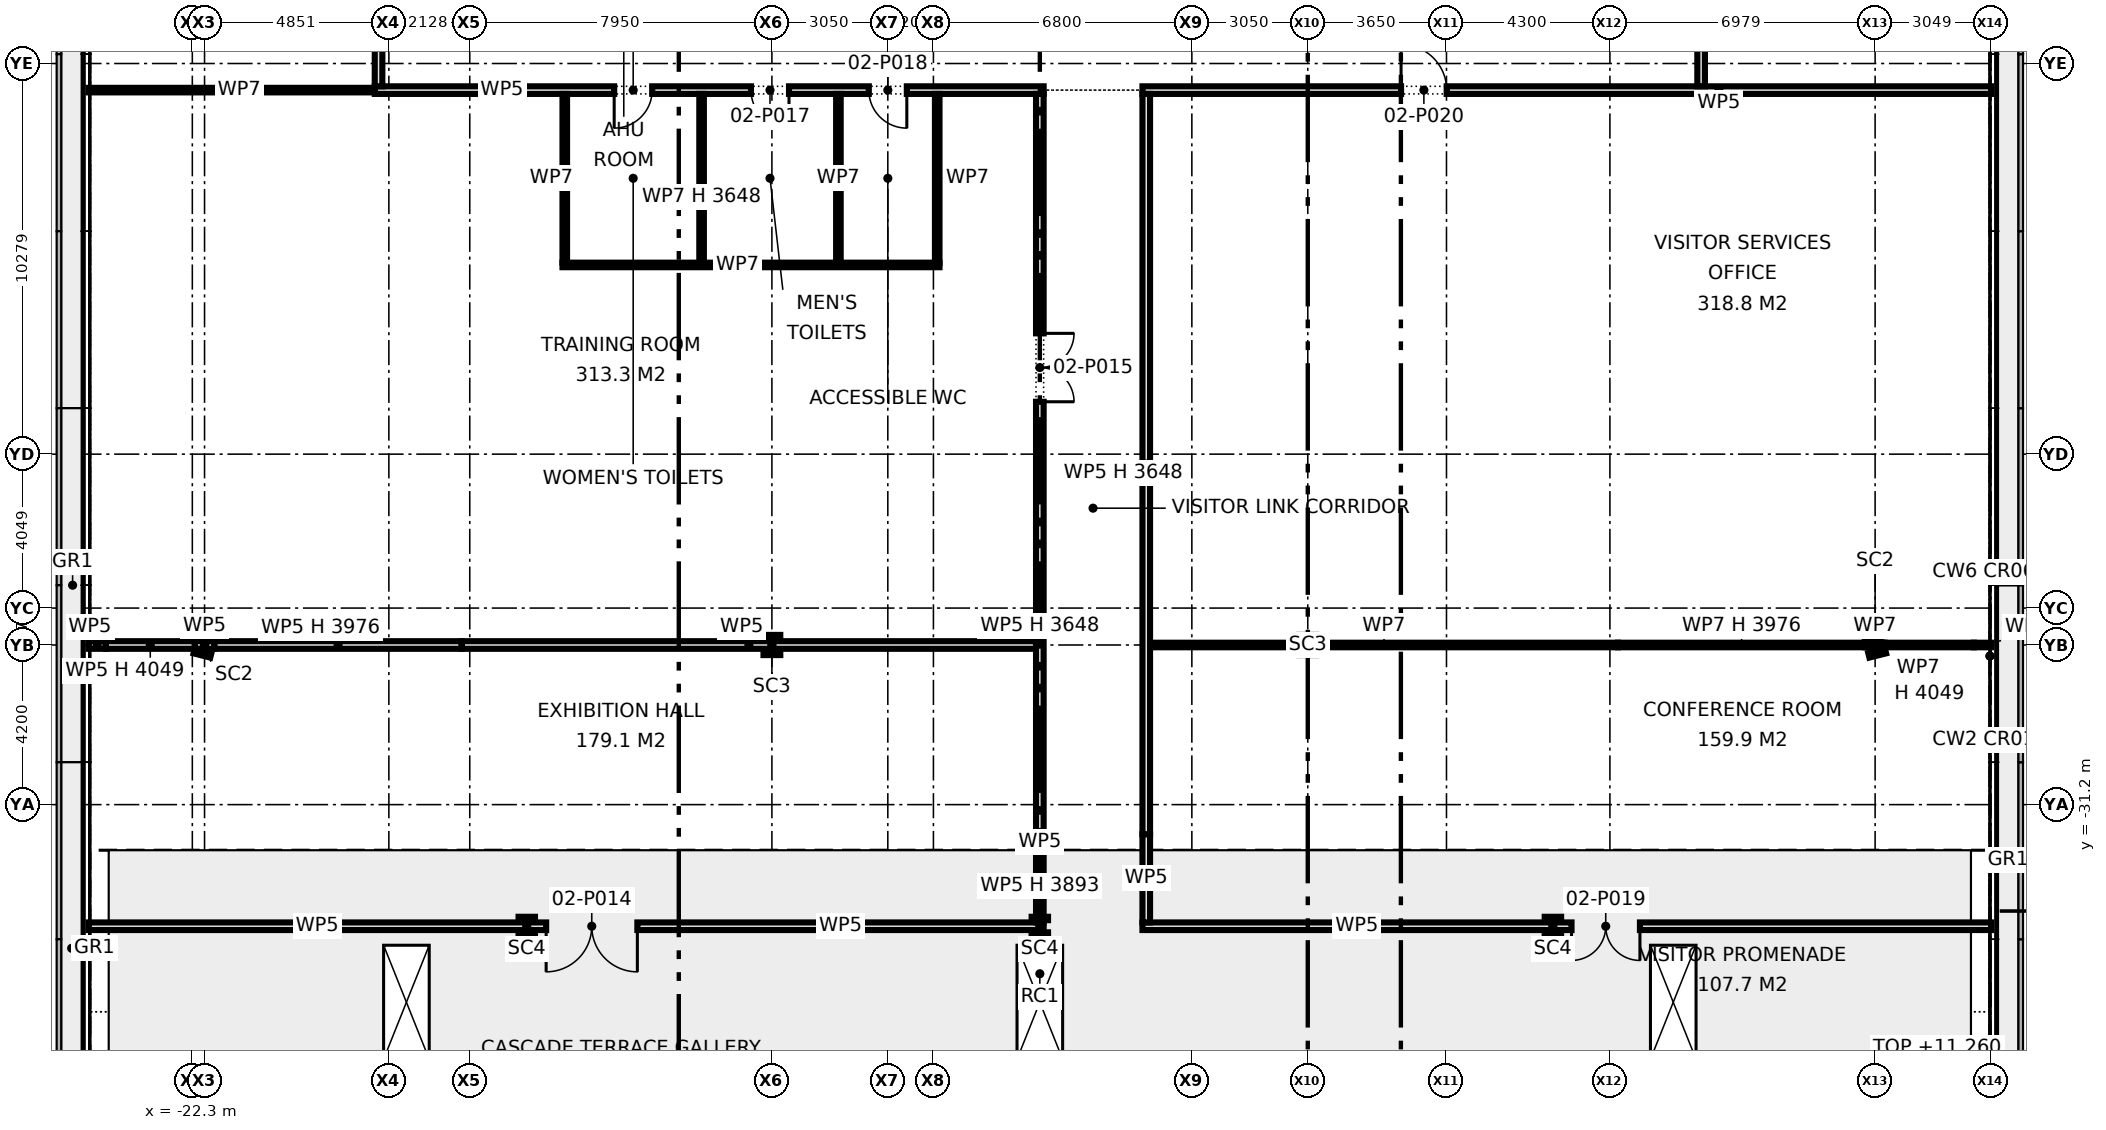
"""IFC4 building model, lengths in metres.
Left out: names, types, materials, properties, quantities, classifications, styles, units other than length and angle.
Written with IfcOpenShell. Run it as: python <this file> out.ifc"""

import sys

from ifc_helpers import new_model, si_unit, direction, frame, frame_2d, origin, origin_2d, place, context, subcontext, project, spatial, rectangle, i_section, extrude, element, fill, save


model = new_model("IFC4")
c1 = context("Model", 3, precision=1e-05, world=origin(), true_north=direction((0.0, 1.0)))
c2 = subcontext(c1, "Body", "Model", "MODEL_VIEW")
j1 = project(units=[si_unit("LENGTHUNIT", "METRE"), si_unit("PLANEANGLEUNIT", "RADIAN")], contexts=[c1])
p1 = place(None, origin())
s1 = spatial("IfcSite", under=j1, at=p1, CompositionType="ELEMENT")
p2 = place(p1, origin())
s2 = spatial("IfcBuilding", under=s1, at=p2, CompositionType="ELEMENT")
p3 = place(p2, frame((0.0, 0.0, 6.5)))
s3 = spatial("IfcBuildingStorey", under=s2, at=p3, CompositionType="ELEMENT", Elevation=6.5)
p4 = place(p3, frame((-21.979, -27.0, 0.0), z_axis=(0.0, 0.0, 1.0), x_axis=(0.969751540043, -0.244094142872, 0.0)))
e1 = element("IfcColumn", 1, at=p4, inside=s3, PredefinedType="COLUMN", context=c2, shape_type="SweptSolid", body=[
    extrude(i_section(OverallWidth=0.455, OverallDepth=0.569, WebThickness=0.078, FlangeThickness=0.125, FilletRadius=0.015, at=origin_2d()), origin(), (0.0, 0.0, 1.0), 4.8),
])
for number, where, z_axis, x_axis in (
    (2, (-7.05, -27.0, 0.0), (0.0, 0.0, 1.0), (1.0, 0.0, 0.0)),
    (3, (7.05, -27.0, 0.0), (0.0, 0.0, 1.0), (1.0, 0.0, 0.0)),
):
    element("IfcColumn", number, at=place(p3, frame(where, z_axis=z_axis, x_axis=x_axis)), inside=s3, PredefinedType="COLUMN", context=c2, shape_type="SweptSolid", body=[
        extrude(i_section(OverallWidth=0.442, OverallDepth=0.531, WebThickness=0.066, FlangeThickness=0.106, FilletRadius=0.015, at=origin_2d()), origin(), (0.0, 0.0, 1.0), 4.8),
    ])
p5 = place(p3, frame((21.979, -27.0, 0.0), z_axis=(0.0, 0.0, 1.0), x_axis=(0.969751540043, 0.244094142872, 0.0)))
e4 = element("IfcColumn", 4, at=p5, inside=s3, PredefinedType="COLUMN", context=c2, shape_type="SweptSolid", body=[
    extrude(i_section(OverallWidth=0.455, OverallDepth=0.569, WebThickness=0.078, FlangeThickness=0.125, FilletRadius=0.015, at=origin_2d()), origin(), (0.0, 0.0, 1.0), 4.8),
])
for number, where, z_axis, x_axis in (
    (5, (-13.5, -34.4, 0.0), (0.0, 0.0, 1.0), (1.0, 0.0, 0.0)),
    (6, (0.0, -34.4, 0.0), (0.0, 0.0, 1.0), (1.0, 0.0, 0.0)),
    (7, (13.5, -34.4, 0.0), (0.0, 0.0, 1.0), (1.0, 0.0, 0.0)),
):
    element("IfcColumn", number, at=place(p3, frame(where, z_axis=z_axis, x_axis=x_axis)), inside=s3, PredefinedType="COLUMN", context=c2, shape_type="SweptSolid", body=[
        extrude(i_section(OverallWidth=0.432, OverallDepth=0.498, WebThickness=0.056, FlangeThickness=0.089, FilletRadius=0.015, at=origin_2d()), origin(), (0.0, 0.0, 1.0), 4.8),
    ])
p6 = place(p3, frame((-25.03, -34.4, 0.0), z_axis=(0.0, 0.0, 1.0), x_axis=(1.0, 0.0, 0.0)))
e8 = element("IfcWall", 8, at=p6, inside=s3, PredefinedType="PARTITIONING", context=c2, shape_type="SweptSolid", body=[
    extrude(rectangle(XDim=25.13, YDim=0.2, at=frame_2d((12.565, 0.0))), origin(), (0.0, 0.0, 1.0), 4.575),
])
p7 = place(p6, frame((12.04, 0.0, 0.0)))
e9 = element("IfcOpeningElement", 9, at=p7, cuts=e8, PredefinedType="OPENING", context=c2, shape_type="SweptSolid", body=[
    extrude(rectangle(XDim=2.4, YDim=2.1, at=frame_2d((1.2, 1.05))), frame((0.0, 0.11, 0.0), z_axis=(0.0, -1.0, 0.0), x_axis=(1.0, 0.0, 0.0)), (0.0, 0.0, 1.0), 0.22),
])
p8 = place(p3, frame((2.7, -34.4, 0.0), z_axis=(0.0, 0.0, 1.0), x_axis=(1.0, 0.0, 0.0)))
e10 = element("IfcWall", 10, at=p8, inside=s3, PredefinedType="PARTITIONING", context=c2, shape_type="SweptSolid", body=[
    extrude(rectangle(XDim=22.33, YDim=0.2, at=frame_2d((11.165, 0.0))), origin(), (0.0, 0.0, 1.0), 4.575),
])
p9 = place(p8, frame((11.29, 0.0, 0.0)))
e11 = element("IfcOpeningElement", 11, at=p9, cuts=e10, PredefinedType="OPENING", context=c2, shape_type="SweptSolid", body=[
    extrude(rectangle(XDim=1.8, YDim=2.1, at=frame_2d((0.9, 1.05))), frame((0.0, 0.11, 0.0), z_axis=(0.0, -1.0, 0.0), x_axis=(1.0, 0.0, 0.0)), (0.0, 0.0, 1.0), 0.22),
])
p10 = place(p3, frame((-25.03, -27.0, 0.0), z_axis=(0.0, 0.0, 1.0), x_axis=(1.0, 0.0, 0.0)))
e12 = element("IfcWall", 12, at=p10, inside=s3, PredefinedType="PARTITIONING", context=c2, shape_type="SweptSolid", body=[
    extrude(rectangle(XDim=0.452, YDim=0.2, at=frame_2d((0.226, 0.0))), origin(), (0.0, 0.0, 1.0), 4.575),
])
p11 = place(p3, frame((-24.578, -27.0, 0.0), z_axis=(0.0, 0.0, 1.0), x_axis=(1.0, 0.0, 0.0)))
e13 = element("IfcWall", 13, at=p11, inside=s3, PredefinedType="PARTITIONING", context=c2, shape_type="SweptSolid", body=[
    extrude(rectangle(XDim=2.344, YDim=0.2, at=frame_2d((1.172, 0.0))), origin(), (0.0, 0.0, 1.0), 4.049),
])
p12 = place(p3, frame((-22.234, -27.0, 0.0), z_axis=(0.0, 0.0, 1.0), x_axis=(1.0, 0.0, 0.0)))
e14 = element("IfcWall", 14, at=p12, inside=s3, PredefinedType="PARTITIONING", context=c2, shape_type="SweptSolid", body=[
    extrude(rectangle(XDim=0.516, YDim=0.2, at=frame_2d((0.258, 0.0))), origin(), (0.0, 0.0, 1.0), 4.575),
])
p13 = place(p3, frame((-21.719, -27.0, 0.0), z_axis=(0.0, 0.0, 1.0), x_axis=(1.0, 0.0, 0.0)))
e15 = element("IfcWall", 15, at=p13, inside=s3, PredefinedType="PARTITIONING", context=c2, shape_type="SweptSolid", body=[
    extrude(rectangle(XDim=6.506, YDim=0.2, at=frame_2d((3.253, 0.0))), origin(), (0.0, 0.0, 1.0), 3.976),
])
p14 = place(p3, frame((-15.212, -27.0, 0.0), z_axis=(0.0, 0.0, 1.0), x_axis=(1.0, 0.0, 0.0)))
e16 = element("IfcWall", 16, at=p14, inside=s3, PredefinedType="PARTITIONING", context=c2, shape_type="SweptSolid", body=[
    extrude(rectangle(XDim=15.112, YDim=0.2, at=frame_2d((7.556, 0.0))), origin(), (0.0, 0.0, 1.0), 4.575),
])
p15 = place(p3, frame((-17.5, -12.4, 0.0), z_axis=(0.0, 0.0, 1.0), x_axis=(1.0, 0.0, 0.0)))
e17 = element("IfcWall", 17, at=p15, inside=s3, PredefinedType="PARTITIONING", context=c2, shape_type="SweptSolid", body=[
    extrude(rectangle(XDim=17.6, YDim=0.2, at=frame_2d((8.8, 0.0))), origin(), (0.0, 0.0, 1.0), 4.575),
])
p16 = place(p15, frame((6.3, 0.0, 0.0)))
e18 = element("IfcOpeningElement", 18, at=p16, cuts=e17, PredefinedType="OPENING", context=c2, shape_type="SweptSolid", body=[
    extrude(rectangle(XDim=1.0, YDim=2.1, at=frame_2d((0.5, 1.05))), frame((0.0, 0.11, 0.0), z_axis=(0.0, -1.0, 0.0), x_axis=(1.0, 0.0, 0.0)), (0.0, 0.0, 1.0), 0.22),
])
p17 = place(p15, frame((9.9, 0.0, 0.0)))
e19 = element("IfcOpeningElement", 19, at=p17, cuts=e17, PredefinedType="OPENING", context=c2, shape_type="SweptSolid", body=[
    extrude(rectangle(XDim=1.0, YDim=2.1, at=frame_2d((0.5, 1.05))), frame((0.0, 0.11, 0.0), z_axis=(0.0, -1.0, 0.0), x_axis=(1.0, 0.0, 0.0)), (0.0, 0.0, 1.0), 0.22),
])
p18 = place(p15, frame((13.0, 0.0, 0.0)))
e20 = element("IfcOpeningElement", 20, at=p18, cuts=e17, PredefinedType="OPENING", context=c2, shape_type="SweptSolid", body=[
    extrude(rectangle(XDim=1.0, YDim=2.1, at=frame_2d((0.5, 1.05))), frame((0.0, 0.11, 0.0), z_axis=(0.0, -1.0, 0.0), x_axis=(1.0, 0.0, 0.0)), (0.0, 0.0, 1.0), 0.22),
])
p19 = place(p3, frame((2.7, -12.4, 0.0), z_axis=(0.0, 0.0, 1.0), x_axis=(1.0, 0.0, 0.0)))
e21 = element("IfcWall", 21, at=p19, inside=s3, PredefinedType="PARTITIONING", context=c2, shape_type="SweptSolid", body=[
    extrude(rectangle(XDim=22.33, YDim=0.2, at=frame_2d((11.165, 0.0))), origin(), (0.0, 0.0, 1.0), 4.575),
])
p20 = place(p19, frame((6.805, 0.0, 0.0)))
e22 = element("IfcOpeningElement", 22, at=p20, cuts=e21, PredefinedType="OPENING", context=c2, shape_type="SweptSolid", body=[
    extrude(rectangle(XDim=1.2, YDim=2.1, at=frame_2d((0.6, 1.05))), frame((0.0, 0.11, 0.0), z_axis=(0.0, -1.0, 0.0), x_axis=(1.0, 0.0, 0.0)), (0.0, 0.0, 1.0), 0.22),
])
p21 = place(p3, frame((17.4, -12.3, 0.0), z_axis=(0.0, 0.0, 1.0), x_axis=(0.0, 1.0, 0.0)))
e23 = element("IfcWall", 23, at=p21, inside=s3, PredefinedType="PARTITIONING", context=c2, shape_type="SweptSolid", body=[
    extrude(rectangle(XDim=24.6, YDim=0.2, at=frame_2d((12.3, 0.0))), origin(), (0.0, 0.0, 1.0), 4.575),
])
p22 = place(p21, frame((6.375, 0.0, 0.0)))
e24 = element("IfcOpeningElement", 24, at=p22, cuts=e23, PredefinedType="OPENING", context=c2, shape_type="SweptSolid", body=[
    extrude(rectangle(XDim=1.8, YDim=2.1, at=frame_2d((0.9, 1.05))), frame((0.0, 0.11, 0.0), z_axis=(0.0, -1.0, 0.0), x_axis=(1.0, 0.0, 0.0)), (0.0, 0.0, 1.0), 0.22),
])
p23 = place(p21, frame((19.075, 0.0, 0.0)))
e25 = element("IfcOpeningElement", 25, at=p23, cuts=e23, PredefinedType="OPENING", context=c2, shape_type="SweptSolid", body=[
    extrude(rectangle(XDim=1.2, YDim=2.1, at=frame_2d((0.6, 1.05))), frame((0.0, 0.11, 0.0), z_axis=(0.0, -1.0, 0.0), x_axis=(1.0, 0.0, 0.0)), (0.0, 0.0, 1.0), 0.22),
])
p24 = place(p3, frame((2.8, -34.3, 0.0), z_axis=(0.0, 0.0, 1.0), x_axis=(0.0, 1.0, 0.0)))
e26 = element("IfcWall", 26, at=p24, inside=s3, PredefinedType="PARTITIONING", context=c2, shape_type="SweptSolid", body=[
    extrude(rectangle(XDim=2.322, YDim=0.2, at=frame_2d((1.161, 0.0))), origin(), (0.0, 0.0, 1.0), 4.575),
])
p25 = place(p3, frame((2.8, -31.978, 0.0), z_axis=(0.0, 0.0, 1.0), x_axis=(0.0, 1.0, 0.0)))
e27 = element("IfcWall", 27, at=p25, inside=s3, PredefinedType="PARTITIONING", context=c2, shape_type="SweptSolid", body=[
    extrude(rectangle(XDim=19.478, YDim=0.2, at=frame_2d((9.739, 0.0))), origin(), (0.0, 0.0, 1.0), 3.648),
])
p26 = place(p3, frame((0.0, -34.3, 0.0), z_axis=(0.0, 0.0, 1.0), x_axis=(0.0, 1.0, 0.0)))
e28 = element("IfcWall", 28, at=p26, inside=s3, PredefinedType="PARTITIONING", context=c2, shape_type="SweptSolid", body=[
    extrude(rectangle(XDim=1.9, YDim=0.2, at=frame_2d((0.95, 0.0))), origin(), (0.0, 0.0, 1.0), 3.893),
])
p27 = place(p3, frame((0.0, -32.4, 0.0), z_axis=(0.0, 0.0, 1.0), x_axis=(0.0, 1.0, 0.0)))
e29 = element("IfcWall", 29, at=p27, inside=s3, PredefinedType="PARTITIONING", context=c2, shape_type="SweptSolid", body=[
    extrude(rectangle(XDim=0.422, YDim=0.2, at=frame_2d((0.211, 0.0))), origin(), (0.0, 0.0, 1.0), 4.575),
])
p28 = place(p3, frame((0.0, -31.978, 0.0), z_axis=(0.0, 0.0, 1.0), x_axis=(0.0, 1.0, 0.0)))
e30 = element("IfcWall", 30, at=p28, inside=s3, PredefinedType="PARTITIONING", context=c2, shape_type="SweptSolid", body=[
    extrude(rectangle(XDim=19.478, YDim=0.2, at=frame_2d((9.739, 0.0))), origin(), (0.0, 0.0, 1.0), 3.648),
])
p29 = place(p28, frame((11.378, 0.0, 0.0)))
e31 = element("IfcOpeningElement", 31, at=p29, cuts=e30, PredefinedType="OPENING", context=c2, shape_type="SweptSolid", body=[
    extrude(rectangle(XDim=1.8, YDim=2.1, at=frame_2d((0.9, 1.05))), frame((0.0, 0.11, 0.0), z_axis=(0.0, -1.0, 0.0), x_axis=(1.0, 0.0, 0.0)), (0.0, 0.0, 1.0), 0.22),
])
p30 = place(p3, frame((-17.4, -12.3, 0.0), z_axis=(0.0, 0.0, 1.0), x_axis=(0.0, 1.0, 0.0)))
e32 = element("IfcWall", 32, at=p30, inside=s3, PredefinedType="PARTITIONING", context=c2, shape_type="SweptSolid", body=[
    extrude(rectangle(XDim=24.6, YDim=0.2, at=frame_2d((12.3, 0.0))), origin(), (0.0, 0.0, 1.0), 4.575),
])
p31 = place(p30, frame((6.675, 0.0, 0.0)))
e33 = element("IfcOpeningElement", 33, at=p31, cuts=e32, PredefinedType="OPENING", context=c2, shape_type="SweptSolid", body=[
    extrude(rectangle(XDim=1.2, YDim=2.1, at=frame_2d((0.6, 1.05))), frame((0.0, 0.11, 0.0), z_axis=(0.0, -1.0, 0.0), x_axis=(1.0, 0.0, 0.0)), (0.0, 0.0, 1.0), 0.22),
])
p32 = place(p30, frame((18.775, 0.0, 0.0)))
e34 = element("IfcOpeningElement", 34, at=p32, cuts=e32, PredefinedType="OPENING", context=c2, shape_type="SweptSolid", body=[
    extrude(rectangle(XDim=1.8, YDim=2.1, at=frame_2d((0.9, 1.05))), frame((0.0, 0.11, 0.0), z_axis=(0.0, -1.0, 0.0), x_axis=(1.0, 0.0, 0.0)), (0.0, 0.0, 1.0), 0.22),
])
p33 = place(p3, frame((2.9, -27.0, 0.0), z_axis=(0.0, 0.0, 1.0), x_axis=(1.0, 0.0, 0.0)))
e35 = element("IfcWall", 35, at=p33, inside=s3, PredefinedType="PARTITIONING", context=c2, shape_type="SweptSolid", body=[
    extrude(rectangle(XDim=12.312, YDim=0.12, at=frame_2d((6.156, 0.0))), origin(), (0.0, 0.0, 1.0), 4.575),
])
p34 = place(p3, frame((15.212, -27.0, 0.0), z_axis=(0.0, 0.0, 1.0), x_axis=(1.0, 0.0, 0.0)))
e36 = element("IfcWall", 36, at=p34, inside=s3, PredefinedType="PARTITIONING", context=c2, shape_type="SweptSolid", body=[
    extrude(rectangle(XDim=6.506, YDim=0.12, at=frame_2d((3.253, 0.0))), origin(), (0.0, 0.0, 1.0), 3.976),
])
p35 = place(p3, frame((21.719, -27.0, 0.0), z_axis=(0.0, 0.0, 1.0), x_axis=(1.0, 0.0, 0.0)))
e37 = element("IfcWall", 37, at=p35, inside=s3, PredefinedType="PARTITIONING", context=c2, shape_type="SweptSolid", body=[
    extrude(rectangle(XDim=0.516, YDim=0.12, at=frame_2d((0.258, 0.0))), origin(), (0.0, 0.0, 1.0), 4.575),
])
p36 = place(p3, frame((22.234, -27.0, 0.0), z_axis=(0.0, 0.0, 1.0), x_axis=(1.0, 0.0, 0.0)))
e38 = element("IfcWall", 38, at=p36, inside=s3, PredefinedType="PARTITIONING", context=c2, shape_type="SweptSolid", body=[
    extrude(rectangle(XDim=2.344, YDim=0.12, at=frame_2d((1.172, 0.0))), origin(), (0.0, 0.0, 1.0), 4.049),
])
p37 = place(p3, frame((24.578, -27.0, 0.0), z_axis=(0.0, 0.0, 1.0), x_axis=(1.0, 0.0, 0.0)))
e39 = element("IfcWall", 39, at=p37, inside=s3, PredefinedType="PARTITIONING", context=c2, shape_type="SweptSolid", body=[
    extrude(rectangle(XDim=0.452, YDim=0.12, at=frame_2d((0.226, 0.0))), origin(), (0.0, 0.0, 1.0), 4.575),
])
p38 = place(p3, frame((-12.56, -17.0, 0.0), z_axis=(0.0, 0.0, 1.0), x_axis=(1.0, 0.0, 0.0)))
e40 = element("IfcWall", 40, at=p38, inside=s3, PredefinedType="PARTITIONING", context=c2, shape_type="SweptSolid", body=[
    extrude(rectangle(XDim=9.92, YDim=0.12, at=frame_2d((4.96, 0.0))), origin(), (0.0, 0.0, 1.0), 4.575),
])
p39 = place(p3, frame((-25.03, -12.4, 0.0), z_axis=(0.0, 0.0, 1.0), x_axis=(1.0, 0.0, 0.0)))
e41 = element("IfcWall", 41, at=p39, inside=s3, PredefinedType="PARTITIONING", context=c2, shape_type="SweptSolid", body=[
    extrude(rectangle(XDim=7.53, YDim=0.12, at=frame_2d((3.765, 0.0))), origin(), (0.0, 0.0, 1.0), 4.575),
])
for number, where, z_axis, x_axis in (
    (42, (-2.7, -16.94, 0.0), (0.0, 0.0, 1.0), (0.0, 1.0, 0.0)),
    (43, (-5.3, -16.94, 0.0), (0.0, 0.0, 1.0), (0.0, 1.0, 0.0)),
):
    element("IfcWall", number, at=place(p3, frame(where, z_axis=z_axis, x_axis=x_axis)), inside=s3, PredefinedType="PARTITIONING", context=c2, shape_type="SweptSolid", body=[
        extrude(rectangle(XDim=4.44, YDim=0.12, at=frame_2d((2.22, 0.0))), origin(), (0.0, 0.0, 1.0), 4.575),
    ])
p40 = place(p3, frame((-8.9, -16.94, 0.0), z_axis=(0.0, 0.0, 1.0), x_axis=(0.0, 1.0, 0.0)))
e44 = element("IfcWall", 44, at=p40, inside=s3, PredefinedType="PARTITIONING", context=c2, shape_type="SweptSolid", body=[
    extrude(rectangle(XDim=4.44, YDim=0.12, at=frame_2d((2.22, 0.0))), origin(), (0.0, 0.0, 1.0), 3.648),
])
p41 = place(p3, frame((-12.5, -16.94, 0.0), z_axis=(0.0, 0.0, 1.0), x_axis=(0.0, 1.0, 0.0)))
e45 = element("IfcWall", 45, at=p41, inside=s3, PredefinedType="PARTITIONING", context=c2, shape_type="SweptSolid", body=[
    extrude(rectangle(XDim=4.44, YDim=0.12, at=frame_2d((2.22, 0.0))), origin(), (0.0, 0.0, 1.0), 4.575),
])
p42 = place(p7, frame((2.4, 0.0, 0.0), z_axis=(0.0, 0.0, 1.0), x_axis=(-1.0, 0.0, 0.0)))
e46 = element("IfcDoor", 46, at=p42, inside=s3, OperationType="DOUBLE_DOOR_SINGLE_SWING", PredefinedType="DOOR", context=c2, shape_type="SweptSolid", body=[
    extrude(rectangle(XDim=2.4, YDim=2.1, at=frame_2d((1.2, 1.05))), frame((0.0, 0.025, 0.0), z_axis=(0.0, -1.0, 0.0), x_axis=(1.0, 0.0, 0.0)), (0.0, 0.0, 1.0), 0.05),
])
fill(e9, e46)
p43 = place(p29, frame((1.8, 0.0, 0.0), z_axis=(0.0, 0.0, 1.0), x_axis=(-1.0, 0.0, 0.0)))
e47 = element("IfcDoor", 47, at=p43, inside=s3, OperationType="DOUBLE_DOOR_SINGLE_SWING", PredefinedType="DOOR", context=c2, shape_type="SweptSolid", body=[
    extrude(rectangle(XDim=1.8, YDim=2.1, at=frame_2d((0.9, 1.05))), frame((0.0, 0.025, 0.0), z_axis=(0.0, -1.0, 0.0), x_axis=(1.0, 0.0, 0.0)), (0.0, 0.0, 1.0), 0.05),
])
fill(e31, e47)
p44 = place(p16, frame((1.0, 0.0, 0.0), z_axis=(0.0, 0.0, 1.0), x_axis=(-1.0, 0.0, 0.0)))
e48 = element("IfcDoor", 48, at=p44, inside=s3, OperationType="SINGLE_SWING_RIGHT", PredefinedType="DOOR", context=c2, shape_type="SweptSolid", body=[
    extrude(rectangle(XDim=1.0, YDim=2.1, at=frame_2d((0.5, 1.05))), frame((0.0, 0.025, 0.0), z_axis=(0.0, -1.0, 0.0), x_axis=(1.0, 0.0, 0.0)), (0.0, 0.0, 1.0), 0.05),
])
fill(e18, e48)
p45 = place(p17, frame((1.0, 0.0, 0.0), z_axis=(0.0, 0.0, 1.0), x_axis=(-1.0, 0.0, 0.0)))
e49 = element("IfcDoor", 49, at=p45, inside=s3, OperationType="SINGLE_SWING_LEFT", PredefinedType="DOOR", context=c2, shape_type="SweptSolid", body=[
    extrude(rectangle(XDim=1.0, YDim=2.1, at=frame_2d((0.5, 1.05))), frame((0.0, 0.025, 0.0), z_axis=(0.0, -1.0, 0.0), x_axis=(1.0, 0.0, 0.0)), (0.0, 0.0, 1.0), 0.05),
])
fill(e19, e49)
p46 = place(p18, frame((1.0, 0.0, 0.0), z_axis=(0.0, 0.0, 1.0), x_axis=(-1.0, 0.0, 0.0)))
e50 = element("IfcDoor", 50, at=p46, inside=s3, OperationType="SINGLE_SWING_LEFT", PredefinedType="DOOR", context=c2, shape_type="SweptSolid", body=[
    extrude(rectangle(XDim=1.0, YDim=2.1, at=frame_2d((0.5, 1.05))), frame((0.0, 0.025, 0.0), z_axis=(0.0, -1.0, 0.0), x_axis=(1.0, 0.0, 0.0)), (0.0, 0.0, 1.0), 0.05),
])
fill(e20, e50)
p47 = place(p9, frame((1.8, 0.0, 0.0), z_axis=(0.0, 0.0, 1.0), x_axis=(-1.0, 0.0, 0.0)))
e51 = element("IfcDoor", 51, at=p47, inside=s3, OperationType="DOUBLE_DOOR_SINGLE_SWING", PredefinedType="DOOR", context=c2, shape_type="SweptSolid", body=[
    extrude(rectangle(XDim=1.8, YDim=2.1, at=frame_2d((0.9, 1.05))), frame((0.0, 0.025, 0.0), z_axis=(0.0, -1.0, 0.0), x_axis=(1.0, 0.0, 0.0)), (0.0, 0.0, 1.0), 0.05),
])
fill(e11, e51)
p48 = place(p20, origin())
e52 = element("IfcDoor", 52, at=p48, inside=s3, OperationType="SINGLE_SWING_LEFT", PredefinedType="DOOR", context=c2, shape_type="SweptSolid", body=[
    extrude(rectangle(XDim=1.2, YDim=2.1, at=frame_2d((0.6, 1.05))), frame((0.0, 0.025, 0.0), z_axis=(0.0, -1.0, 0.0), x_axis=(1.0, 0.0, 0.0)), (0.0, 0.0, 1.0), 0.05),
])
fill(e22, e52)
save(model, sys.argv[1])
